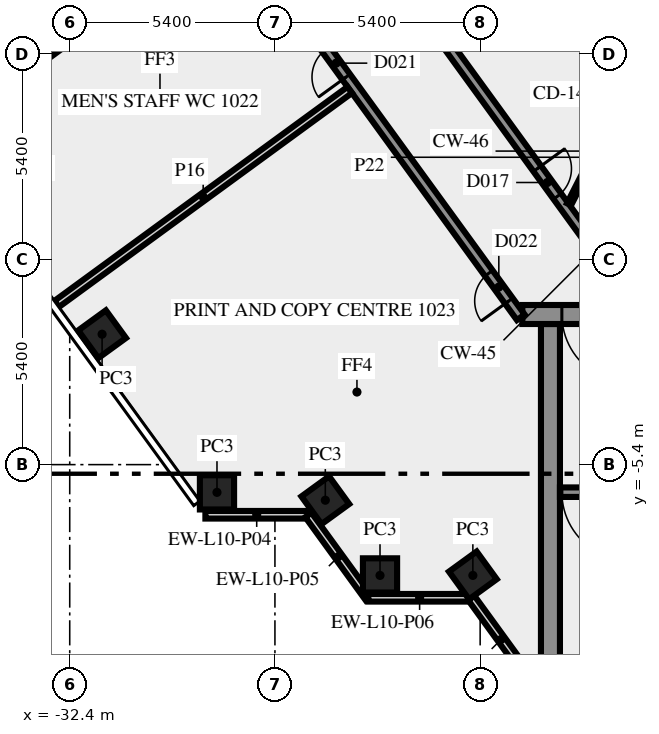
"""IFC4 building model, lengths in metres.
Left out: names, types, materials, properties, quantities, classifications, styles, units other than length and angle.
Written with IfcOpenShell. Run it as: python <this file> out.ifc"""

import sys

from ifc_helpers import new_model, si_unit, direction, frame, frame_2d, origin, origin_2d, place, context, subcontext, project, spatial, rectangle, extrude, element, fill, save


model = new_model("IFC4")
c1 = context("Model", 3, precision=1e-05, world=origin(), true_north=direction((0.0, 1.0)))
c2 = subcontext(c1, "Body", "Model", "MODEL_VIEW")
j1 = project(units=[si_unit("LENGTHUNIT", "METRE"), si_unit("PLANEANGLEUNIT", "RADIAN")], contexts=[c1])
p1 = place(None, origin())
s1 = spatial("IfcSite", under=j1, at=p1, CompositionType="ELEMENT")
p2 = place(p1, origin())
s2 = spatial("IfcBuilding", under=s1, at=p2, CompositionType="ELEMENT")
p3 = place(p2, frame((0.0, 0.0, 47.0)))
s3 = spatial("IfcBuildingStorey", under=s2, at=p3, CompositionType="ELEMENT", Elevation=47.0)
for number, where, z_axis, x_axis in (
    (1, (-31.548, -1.969, 0.0), (0.0, 0.0, 1.0), (0.588, -0.809, 0.0)),
    (2, (-28.525, -6.13, 0.0), (0.0, 0.0, 1.0), (1.0, 0.0, 0.0)),
    (3, (-25.674, -6.337, 0.0), (0.0, 0.0, 1.0), (0.588, -0.809, 0.0)),
    (4, (-24.235, -8.315, 0.0), (0.0, 0.0, 1.0), (1.0, 0.0, 0.0)),
    (5, (-21.792, -8.315, 0.0), (0.0, 0.0, 1.0), (0.588, -0.809, 0.0)),
):
    element("IfcColumn", number, at=place(p3, frame(where, z_axis=z_axis, x_axis=x_axis)), inside=s3, PredefinedType="COLUMN", context=c2, shape_type="SweptSolid", body=[
        extrude(rectangle(XDim=0.9, YDim=0.9, at=origin_2d()), origin(), (0.0, 0.0, 1.0), 3.65),
    ])
p4 = place(p3, frame((-28.83, -6.719, 0.0), z_axis=(0.0, 0.0, 1.0), x_axis=(1.0, 0.0, 0.0)))
e6 = element("IfcWall", 6, at=p4, inside=s3, PredefinedType="SOLIDWALL", context=c2, shape_type="SweptSolid", body=[
    extrude(rectangle(XDim=2.7, YDim=0.2, at=frame_2d((1.35, 0.0))), origin(), (0.0, 0.0, 1.0), 3.65),
])
p5 = place(p3, frame((-26.12, -6.724, 0.0), z_axis=(0.0, 0.0, 1.0), x_axis=(0.587720002413, -0.809064397168, 0.0)))
e7 = element("IfcWall", 7, at=p5, inside=s3, PredefinedType="SOLIDWALL", context=c2, shape_type="SweptSolid", body=[
    extrude(rectangle(XDim=2.7, YDim=0.2, at=frame_2d((1.35, 0.0))), origin(), (0.0, 0.0, 1.0), 3.65),
])
p6 = place(p3, frame((-24.543, -8.904, 0.0), z_axis=(0.0, 0.0, 1.0), x_axis=(1.0, 0.0, 0.0)))
e8 = element("IfcWall", 8, at=p6, inside=s3, PredefinedType="SOLIDWALL", context=c2, shape_type="SweptSolid", body=[
    extrude(rectangle(XDim=2.7, YDim=0.2, at=frame_2d((1.35, 0.0))), origin(), (0.0, 0.0, 1.0), 3.65),
])
p7 = place(p3, frame((-21.833, -8.909, 0.0), z_axis=(0.0, 0.0, 1.0), x_axis=(0.587766567315, -0.809030569476, 0.0)))
e9 = element("IfcWall", 9, at=p7, inside=s3, PredefinedType="SOLIDWALL", context=c2, shape_type="SweptSolid", body=[
    extrude(rectangle(XDim=2.688, YDim=0.2, at=frame_2d((1.344, 0.0))), origin(), (0.0, 0.0, 1.0), 3.65),
])
p8 = place(p3, frame((-19.75, -10.5, 0.0), z_axis=(0.0, 0.0, 1.0), x_axis=(0.0, 1.0, 0.0)))
e10 = element("IfcWall", 10, at=p8, inside=s3, PredefinedType="SHEAR", context=c2, shape_type="SweptSolid", body=[
    extrude(rectangle(XDim=8.8, YDim=0.5, at=frame_2d((4.4, 0.0))), origin(), (0.0, 0.0, 1.0), 3.65),
])
p9 = place(p3, frame((-11.45, -6.125, 0.0), z_axis=(0.0, 0.0, 1.0), x_axis=(-1.0, 0.0, 0.0)))
e11 = element("IfcWall", 11, at=p9, inside=s3, PredefinedType="SHEAR", context=c2, shape_type="SweptSolid", body=[
    extrude(rectangle(XDim=8.05, YDim=0.25, at=frame_2d((4.025, 0.0))), origin(), (0.0, 0.0, 1.0), 3.65),
])
p10 = place(p9, frame((6.2, 0.0, 0.0)))
e12 = element("IfcOpeningElement", 12, at=p10, cuts=e11, PredefinedType="OPENING", context=c2, shape_type="SweptSolid", body=[
    extrude(rectangle(XDim=1.8, YDim=2.1, at=frame_2d((0.9, 1.05))), frame((0.0, 0.135, 0.0), z_axis=(0.0, -1.0, 0.0), x_axis=(1.0, 0.0, 0.0)), (0.0, 0.0, 1.0), 0.27),
])
p11 = place(p3, frame((20.49, -1.45, 0.0), z_axis=(0.0, 0.0, 1.0), x_axis=(-1.0, 0.0, 0.0)))
e13 = element("IfcWall", 13, at=p11, inside=s3, PredefinedType="SHEAR", context=c2, shape_type="SweptSolid", body=[
    extrude(rectangle(XDim=40.98, YDim=0.5, at=frame_2d((20.49, 0.0))), origin(), (0.0, 0.0, 1.0), 3.65),
])
p12 = place(p11, frame((38.14, 0.0, 0.0)))
e14 = element("IfcOpeningElement", 14, at=p12, cuts=e13, PredefinedType="OPENING", context=c2, shape_type="SweptSolid", body=[
    extrude(rectangle(XDim=1.8, YDim=2.1, at=frame_2d((0.9, 1.05))), frame((0.0, 0.26, 0.0), z_axis=(0.0, -1.0, 0.0), x_axis=(1.0, 0.0, 0.0)), (0.0, 0.0, 1.0), 0.52),
])
p13 = place(p11, frame((35.89, 0.0, 0.0)))
e15 = element("IfcOpeningElement", 15, at=p13, cuts=e13, PredefinedType="OPENING", context=c2, shape_type="SweptSolid", body=[
    extrude(rectangle(XDim=0.9, YDim=2.1, at=frame_2d((0.45, 1.05))), frame((0.0, 0.26, 0.0), z_axis=(0.0, -1.0, 0.0), x_axis=(1.0, 0.0, 0.0)), (0.0, 0.0, 1.0), 0.52),
])
p14 = place(p11, frame((32.94, 0.0, 0.0)))
e16 = element("IfcOpeningElement", 16, at=p14, cuts=e13, PredefinedType="OPENING", context=c2, shape_type="SweptSolid", body=[
    extrude(rectangle(XDim=0.9, YDim=2.1, at=frame_2d((0.45, 1.05))), frame((0.0, 0.26, 0.0), z_axis=(0.0, -1.0, 0.0), x_axis=(1.0, 0.0, 0.0)), (0.0, 0.0, 1.0), 0.52),
])
p15 = place(p11, frame((19.59, 0.0, 0.0)))
e17 = element("IfcOpeningElement", 17, at=p15, cuts=e13, PredefinedType="OPENING", context=c2, shape_type="SweptSolid", body=[
    extrude(rectangle(XDim=2.0, YDim=2.1, at=frame_2d((1.0, 1.05))), frame((0.0, 0.26, 0.0), z_axis=(0.0, -1.0, 0.0), x_axis=(1.0, 0.0, 0.0)), (0.0, 0.0, 1.0), 0.52),
])
p16 = place(p11, frame((7.14, 0.0, 0.0)))
e18 = element("IfcOpeningElement", 18, at=p16, cuts=e13, PredefinedType="OPENING", context=c2, shape_type="SweptSolid", body=[
    extrude(rectangle(XDim=0.9, YDim=2.1, at=frame_2d((0.45, 1.05))), frame((0.0, 0.26, 0.0), z_axis=(0.0, -1.0, 0.0), x_axis=(1.0, 0.0, 0.0)), (0.0, 0.0, 1.0), 0.52),
])
p17 = place(p11, frame((5.028, 0.0, 0.0)))
e19 = element("IfcOpeningElement", 19, at=p17, cuts=e13, PredefinedType="OPENING", context=c2, shape_type="SweptSolid", body=[
    extrude(rectangle(XDim=0.8, YDim=2.1, at=frame_2d((0.4, 1.05))), frame((0.0, 0.26, 0.0), z_axis=(0.0, -1.0, 0.0), x_axis=(1.0, 0.0, 0.0)), (0.0, 0.0, 1.0), 0.52),
])
p18 = place(p11, frame((3.452, 0.0, 0.0)))
e20 = element("IfcOpeningElement", 20, at=p18, cuts=e13, PredefinedType="OPENING", context=c2, shape_type="SweptSolid", body=[
    extrude(rectangle(XDim=0.8, YDim=2.1, at=frame_2d((0.4, 1.05))), frame((0.0, 0.26, 0.0), z_axis=(0.0, -1.0, 0.0), x_axis=(1.0, 0.0, 0.0)), (0.0, 0.0, 1.0), 0.52),
])
p19 = place(p11, frame((1.04, 0.0, 0.0)))
e21 = element("IfcOpeningElement", 21, at=p19, cuts=e13, PredefinedType="OPENING", context=c2, shape_type="SweptSolid", body=[
    extrude(rectangle(XDim=1.8, YDim=2.1, at=frame_2d((0.9, 1.05))), frame((0.0, 0.26, 0.0), z_axis=(0.0, -1.0, 0.0), x_axis=(1.0, 0.0, 0.0)), (0.0, 0.0, 1.0), 0.52),
])
p20 = place(p3, frame((-20.531, -1.523, 0.0), z_axis=(0.0, 0.0, 1.0), x_axis=(-0.587784593204, 0.809017473231, 0.0)))
e22 = element("IfcWall", 22, at=p20, inside=s3, PredefinedType="SOLIDWALL", context=c2, shape_type="SweptSolid", body=[
    extrude(rectangle(XDim=44.67, YDim=0.25, at=frame_2d((22.335, 0.0))), origin(), (0.0, 0.0, 1.0), 3.65),
])
p21 = place(p20, frame((26.14, 0.0, 0.0)))
e23 = element("IfcOpeningElement", 23, at=p21, cuts=e22, PredefinedType="OPENING", context=c2, shape_type="SweptSolid", body=[
    extrude(rectangle(XDim=1.8, YDim=2.1, at=frame_2d((0.9, 1.05))), frame((0.0, 0.135, 0.0), z_axis=(0.0, -1.0, 0.0), x_axis=(1.0, 0.0, 0.0)), (0.0, 0.0, 1.0), 0.27),
])
p22 = place(p20, frame((43.296, 0.0, 0.0)))
e24 = element("IfcOpeningElement", 24, at=p22, cuts=e22, PredefinedType="OPENING", context=c2, shape_type="SweptSolid", body=[
    extrude(rectangle(XDim=0.9, YDim=2.1, at=frame_2d((0.45, 1.05))), frame((0.0, 0.135, 0.0), z_axis=(0.0, -1.0, 0.0), x_axis=(1.0, 0.0, 0.0)), (0.0, 0.0, 1.0), 0.27),
])
p23 = place(p20, frame((13.216, 0.0, 0.0)))
e25 = element("IfcOpeningElement", 25, at=p23, cuts=e22, PredefinedType="OPENING", context=c2, shape_type="SweptSolid", body=[
    extrude(rectangle(XDim=0.9, YDim=2.1, at=frame_2d((0.45, 1.05))), frame((0.0, 0.135, 0.0), z_axis=(0.0, -1.0, 0.0), x_axis=(1.0, 0.0, 0.0)), (0.0, 0.0, 1.0), 0.27),
])
p24 = place(p20, frame((7.816, 0.0, 0.0)))
e26 = element("IfcOpeningElement", 26, at=p24, cuts=e22, PredefinedType="OPENING", context=c2, shape_type="SweptSolid", body=[
    extrude(rectangle(XDim=0.9, YDim=2.1, at=frame_2d((0.45, 1.05))), frame((0.0, 0.135, 0.0), z_axis=(0.0, -1.0, 0.0), x_axis=(1.0, 0.0, 0.0)), (0.0, 0.0, 1.0), 0.27),
])
p25 = place(p20, frame((0.533, 0.0, 0.0)))
e27 = element("IfcOpeningElement", 27, at=p25, cuts=e22, PredefinedType="OPENING", context=c2, shape_type="SweptSolid", body=[
    extrude(rectangle(XDim=0.9, YDim=2.1, at=frame_2d((0.45, 1.05))), frame((0.0, 0.135, 0.0), z_axis=(0.0, -1.0, 0.0), x_axis=(1.0, 0.0, 0.0)), (0.0, 0.0, 1.0), 0.27),
])
p26 = place(p3, frame((-37.232, 25.972, 0.0), z_axis=(0.0, 0.0, 1.0), x_axis=(0.587786323093, -0.809016216391, 0.0)))
e28 = element("IfcWall", 28, at=p26, inside=s3, PredefinedType="SOLIDWALL", context=c2, shape_type="SweptSolid", body=[
    extrude(rectangle(XDim=33.493, YDim=0.25, at=frame_2d((16.747, 0.0))), origin(), (0.0, 0.0, 1.0), 3.65),
])
p27 = place(p26, frame((2.935, 0.0, 0.0)))
e29 = element("IfcOpeningElement", 29, at=p27, cuts=e28, PredefinedType="OPENING", context=c2, shape_type="SweptSolid", body=[
    extrude(rectangle(XDim=0.9, YDim=2.1, at=frame_2d((0.45, 1.05))), frame((0.0, 0.135, 0.0), z_axis=(0.0, -1.0, 0.0), x_axis=(1.0, 0.0, 0.0)), (0.0, 0.0, 1.0), 0.27),
])
p28 = place(p26, frame((16.435, 0.0, 0.0)))
e30 = element("IfcOpeningElement", 30, at=p28, cuts=e28, PredefinedType="OPENING", context=c2, shape_type="SweptSolid", body=[
    extrude(rectangle(XDim=0.9, YDim=2.1, at=frame_2d((0.45, 1.05))), frame((0.0, 0.135, 0.0), z_axis=(0.0, -1.0, 0.0), x_axis=(1.0, 0.0, 0.0)), (0.0, 0.0, 1.0), 0.27),
])
p29 = place(p26, frame((29.152, 0.0, 0.0)))
e31 = element("IfcOpeningElement", 31, at=p29, cuts=e28, PredefinedType="OPENING", context=c2, shape_type="SweptSolid", body=[
    extrude(rectangle(XDim=0.9, YDim=2.1, at=frame_2d((0.45, 1.05))), frame((0.0, 0.135, 0.0), z_axis=(0.0, -1.0, 0.0), x_axis=(1.0, 0.0, 0.0)), (0.0, 0.0, 1.0), 0.27),
])
p30 = place(p26, frame((14.536, 0.0, 0.0)))
e32 = element("IfcOpeningElement", 32, at=p30, cuts=e28, PredefinedType="OPENING", context=c2, shape_type="SweptSolid", body=[
    extrude(rectangle(XDim=1.2, YDim=2.1, at=frame_2d((0.6, 1.05))), frame((0.0, 0.135, 0.0), z_axis=(0.0, -1.0, 0.0), x_axis=(1.0, 0.0, 0.0)), (0.0, 0.0, 1.0), 0.27),
])
p31 = place(p26, frame((1.335, 0.0, 0.0)))
e33 = element("IfcOpeningElement", 33, at=p31, cuts=e28, PredefinedType="OPENING", context=c2, shape_type="SweptSolid", body=[
    extrude(rectangle(XDim=0.9, YDim=2.1, at=frame_2d((0.45, 1.05))), frame((0.0, 0.135, 0.0), z_axis=(0.0, -1.0, 0.0), x_axis=(1.0, 0.0, 0.0)), (0.0, 0.0, 1.0), 0.27),
])
p32 = place(p3, frame((-35.919, 3.197, 0.0), z_axis=(0.0, 0.0, 1.0), x_axis=(0.807645841498, 0.589667868135, 0.0)))
e34 = element("IfcWall", 34, at=p32, inside=s3, PredefinedType="PARTITIONING", context=c2, shape_type="SweptSolid", body=[
    extrude(rectangle(XDim=9.551, YDim=0.12, at=frame_2d((4.775, 0.0))), origin(), (0.0, 0.0, 1.0), 2.75),
])
p33 = place(p3, frame((-32.745, -1.173, 0.0), z_axis=(0.0, 0.0, 1.0), x_axis=(0.80760371321, 0.589725565334, 0.0)))
e35 = element("IfcWall", 35, at=p33, inside=s3, PredefinedType="SOLIDWALL", context=c2, shape_type="SweptSolid", body=[
    extrude(rectangle(XDim=9.55, YDim=0.2, at=frame_2d((4.775, 0.0))), origin(), (0.0, 0.0, 1.0), 2.75),
])
p34 = place(p3, frame((-19.261, 1.45, 0.0), z_axis=(0.0, 0.0, 1.0), x_axis=(0.453950796792, 0.891026752736, 0.0)))
e36 = element("IfcWall", 36, at=p34, inside=s3, PredefinedType="PARTITIONING", context=c2, shape_type="SweptSolid", body=[
    extrude(rectangle(XDim=2.778, YDim=0.12, at=frame_2d((1.389, 0.0))), origin(), (0.0, 0.0, 1.0), 3.65),
])
p35 = place(p10, origin())
e37 = element("IfcDoor", 37, at=p35, inside=s3, OperationType="DOUBLE_DOOR_SINGLE_SWING", PredefinedType="DOOR", context=c2, shape_type="SweptSolid", body=[
    extrude(rectangle(XDim=1.8, YDim=2.1, at=frame_2d((0.9, 1.05))), frame((0.0, 0.025, 0.0), z_axis=(0.0, -1.0, 0.0), x_axis=(1.0, 0.0, 0.0)), (0.0, 0.0, 1.0), 0.05),
])
fill(e12, e37)
p36 = place(p12, origin())
e38 = element("IfcDoor", 38, at=p36, inside=s3, OperationType="DOUBLE_DOOR_SINGLE_SWING", PredefinedType="DOOR", context=c2, shape_type="SweptSolid", body=[
    extrude(rectangle(XDim=1.8, YDim=2.1, at=frame_2d((0.9, 1.05))), frame((0.0, 0.025, 0.0), z_axis=(0.0, -1.0, 0.0), x_axis=(1.0, 0.0, 0.0)), (0.0, 0.0, 1.0), 0.05),
])
fill(e14, e38)
p37 = place(p24, origin())
e39 = element("IfcDoor", 39, at=p37, inside=s3, OperationType="SINGLE_SWING_LEFT", PredefinedType="DOOR", context=c2, shape_type="SweptSolid", body=[
    extrude(rectangle(XDim=0.9, YDim=2.1, at=frame_2d((0.45, 1.05))), frame((0.0, 0.025, 0.0), z_axis=(0.0, -1.0, 0.0), x_axis=(1.0, 0.0, 0.0)), (0.0, 0.0, 1.0), 0.05),
])
fill(e26, e39)
p38 = place(p29, origin())
e40 = element("IfcDoor", 40, at=p38, inside=s3, OperationType="SINGLE_SWING_RIGHT", PredefinedType="DOOR", context=c2, shape_type="SweptSolid", body=[
    extrude(rectangle(XDim=0.9, YDim=2.1, at=frame_2d((0.45, 1.05))), frame((0.0, 0.025, 0.0), z_axis=(0.0, -1.0, 0.0), x_axis=(1.0, 0.0, 0.0)), (0.0, 0.0, 1.0), 0.05),
])
fill(e31, e40)
p39 = place(p25, origin())
e41 = element("IfcDoor", 41, at=p39, inside=s3, OperationType="SINGLE_SWING_LEFT", PredefinedType="DOOR", context=c2, shape_type="SweptSolid", body=[
    extrude(rectangle(XDim=0.9, YDim=2.1, at=frame_2d((0.45, 1.05))), frame((0.0, 0.025, 0.0), z_axis=(0.0, -1.0, 0.0), x_axis=(1.0, 0.0, 0.0)), (0.0, 0.0, 1.0), 0.05),
])
fill(e27, e41)
save(model, sys.argv[1])
